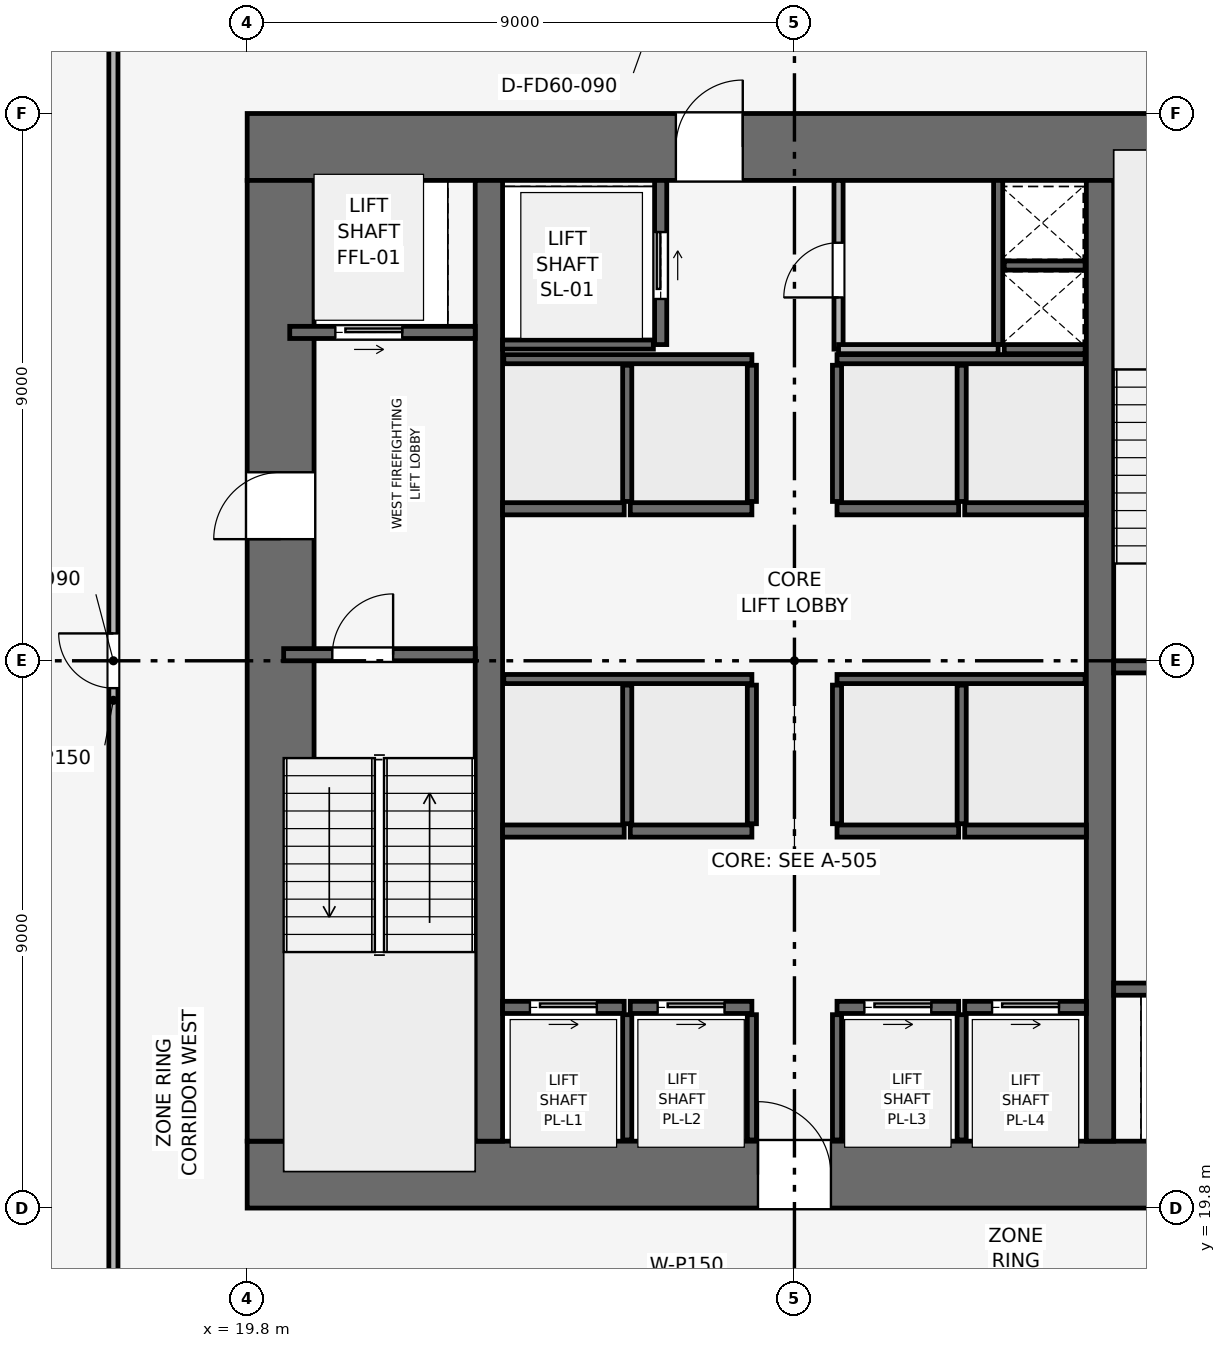
"""IFC4 building model, lengths in metres.
Left out: names, types, materials, properties, quantities, classifications, styles, units other than length and angle.
Written with IfcOpenShell. Run it as: python <this file> out.ifc"""

import sys

from ifc_helpers import new_model, si_unit, direction, frame, frame_2d, origin, place, context, subcontext, project, spatial, rectangle, extrude, element, fill, save


model = new_model("IFC4")
c1 = context("Model", 3, precision=1e-05, world=origin(), true_north=direction((0.0, 1.0)))
c2 = subcontext(c1, "Body", "Model", "MODEL_VIEW")
j1 = project(units=[si_unit("LENGTHUNIT", "METRE"), si_unit("PLANEANGLEUNIT", "RADIAN")], contexts=[c1])
p1 = place(None, origin())
s1 = spatial("IfcSite", under=j1, at=p1, CompositionType="ELEMENT")
p2 = place(p1, origin())
s2 = spatial("IfcBuilding", under=s1, at=p2, CompositionType="ELEMENT")
p3 = place(p2, frame((0.0, 0.0, 96.3)))
s3 = spatial("IfcBuildingStorey", under=s2, at=p3, CompositionType="ELEMENT", Elevation=96.3)
p4 = place(p3, frame((19.8, 20.35, 0.0), z_axis=(0.0, 0.0, 1.0), x_axis=(1.0, 0.0, 0.0)))
e1 = element("IfcWall", 1, at=p4, inside=s3, PredefinedType="SHEAR", context=c2, shape_type="SweptSolid", body=[
    extrude(rectangle(XDim=18.0, YDim=1.1, at=frame_2d((9.0, 0.0))), origin(), (0.0, 0.0, 1.0), 3.9),
])
p5 = place(p4, frame((8.4, 0.0, 0.0)))
e2 = element("IfcOpeningElement", 2, at=p5, cuts=e1, PredefinedType="OPENING", context=c2, shape_type="SweptSolid", body=[
    extrude(rectangle(XDim=1.2, YDim=2.2, at=frame_2d((0.6, 1.1))), frame((0.0, 0.56, 0.0), z_axis=(0.0, -1.0, 0.0), x_axis=(1.0, 0.0, 0.0)), (0.0, 0.0, 1.0), 1.12),
])
p6 = place(p3, frame((19.8, 37.25, 0.0), z_axis=(0.0, 0.0, 1.0), x_axis=(1.0, 0.0, 0.0)))
e3 = element("IfcWall", 3, at=p6, inside=s3, PredefinedType="SHEAR", context=c2, shape_type="SweptSolid", body=[
    extrude(rectangle(XDim=18.0, YDim=1.1, at=frame_2d((9.0, 0.0))), origin(), (0.0, 0.0, 1.0), 3.9),
])
p7 = place(p6, frame((7.05, 0.0, 0.0)))
e4 = element("IfcOpeningElement", 4, at=p7, cuts=e3, PredefinedType="OPENING", context=c2, shape_type="SweptSolid", body=[
    extrude(rectangle(XDim=1.1, YDim=2.15, at=frame_2d((0.55, 1.075))), frame((0.0, 0.56, 0.0), z_axis=(0.0, -1.0, 0.0), x_axis=(1.0, 0.0, 0.0)), (0.0, 0.0, 1.0), 1.12),
])
p8 = place(p3, frame((20.35, 20.9, 0.0), z_axis=(0.0, 0.0, 1.0), x_axis=(0.0, 1.0, 0.0)))
e5 = element("IfcWall", 5, at=p8, inside=s3, PredefinedType="SHEAR", context=c2, shape_type="SweptSolid", body=[
    extrude(rectangle(XDim=15.8, YDim=1.1, at=frame_2d((7.9, 0.0))), origin(), (0.0, 0.0, 1.0), 3.9),
])
p9 = place(p8, frame((9.9, 0.0, 0.0)))
e6 = element("IfcOpeningElement", 6, at=p9, cuts=e5, PredefinedType="OPENING", context=c2, shape_type="SweptSolid", body=[
    extrude(rectangle(XDim=1.1, YDim=2.15, at=frame_2d((0.55, 1.075))), frame((0.0, 0.56, 0.0), z_axis=(0.0, -1.0, 0.0), x_axis=(1.0, 0.0, 0.0)), (0.0, 0.0, 1.0), 1.12),
])
for number, where, z_axis, x_axis in (
    (7, (23.775, 20.9, 0.0), (0.0, 0.0, 1.0), (0.0, 1.0, 0.0)),
    (8, (33.825, 20.9, 0.0), (0.0, 0.0, 1.0), (0.0, 1.0, 0.0)),
):
    element("IfcWall", number, at=place(p3, frame(where, z_axis=z_axis, x_axis=x_axis)), inside=s3, PredefinedType="SHEAR", context=c2, shape_type="SweptSolid", body=[
        extrude(rectangle(XDim=15.8, YDim=0.45, at=frame_2d((7.9, 0.0))), origin(), (0.0, 0.0, 1.0), 3.9),
    ])
p10 = place(p3, frame((20.4, 28.9, 0.0), z_axis=(0.0, 0.0, 1.0), x_axis=(1.0, 0.0, 0.0)))
e9 = element("IfcWall", 9, at=p10, inside=s3, PredefinedType="SHEAR", context=c2, shape_type="SweptSolid", body=[
    extrude(rectangle(XDim=3.15, YDim=0.2, at=frame_2d((1.575, 0.0))), origin(), (0.0, 0.0, 1.0), 3.65),
])
p11 = place(p10, frame((0.8, 0.0, 0.0)))
e10 = element("IfcOpeningElement", 10, at=p11, cuts=e9, PredefinedType="OPENING", context=c2, shape_type="SweptSolid", body=[
    extrude(rectangle(XDim=1.0, YDim=2.1, at=frame_2d((0.5, 1.05))), frame((0.0, 0.11, 0.0), z_axis=(0.0, -1.0, 0.0), x_axis=(1.0, 0.0, 0.0)), (0.0, 0.0, 1.0), 0.22),
])
p12 = place(p3, frame((34.05, 28.7, 0.0), z_axis=(0.0, 0.0, 1.0), x_axis=(1.0, 0.0, 0.0)))
e11 = element("IfcWall", 11, at=p12, inside=s3, PredefinedType="SHEAR", context=c2, shape_type="SweptSolid", body=[
    extrude(rectangle(XDim=3.15, YDim=0.2, at=frame_2d((1.575, 0.0))), origin(), (0.0, 0.0, 1.0), 3.65),
])
p13 = place(p12, frame((0.8, 0.0, 0.0)))
e12 = element("IfcOpeningElement", 12, at=p13, cuts=e11, PredefinedType="OPENING", context=c2, shape_type="SweptSolid", body=[
    extrude(rectangle(XDim=1.0, YDim=2.1, at=frame_2d((0.5, 1.05))), frame((0.0, 0.11, 0.0), z_axis=(0.0, -1.0, 0.0), x_axis=(1.0, 0.0, 0.0)), (0.0, 0.0, 1.0), 0.22),
])
p14 = place(p3, frame((32.15, 34.0, 0.0), z_axis=(0.0, 0.0, 1.0), x_axis=(0.0, 1.0, 0.0)))
e13 = element("IfcWall", 13, at=p14, inside=s3, PredefinedType="SHEAR", context=c2, shape_type="SweptSolid", body=[
    extrude(rectangle(XDim=2.7, YDim=0.15, at=frame_2d((1.35, 0.0))), origin(), (0.0, 0.0, 1.0), 3.65),
])
for number, where, z_axis, x_axis in (
    (14, (32.25, 33.925, 0.0), (0.0, 0.0, 1.0), (1.0, 0.0, 0.0)),
    (15, (32.25, 35.3, 0.0), (0.0, 0.0, 1.0), (1.0, 0.0, 0.0)),
):
    element("IfcWall", number, at=place(p3, frame(where, z_axis=z_axis, x_axis=x_axis)), inside=s3, PredefinedType="SHEAR", context=c2, shape_type="SweptSolid", body=[
        extrude(rectangle(XDim=1.33, YDim=0.15, at=frame_2d((0.665, 0.0))), origin(), (0.0, 0.0, 1.0), 3.65),
    ])
p15 = place(p3, frame((20.5, 34.2, 0.0), z_axis=(0.0, 0.0, 1.0), x_axis=(1.0, 0.0, 0.0)))
e16 = element("IfcWall", 16, at=p15, inside=s3, PredefinedType="SHEAR", context=c2, shape_type="SweptSolid", body=[
    extrude(rectangle(XDim=3.05, YDim=0.2, at=frame_2d((1.525, 0.0))), origin(), (0.0, 0.0, 1.0), 3.65),
])
p16 = place(p15, frame((0.75, 0.0, 0.0)))
e17 = element("IfcOpeningElement", 17, at=p16, cuts=e16, PredefinedType="OPENING", context=c2, shape_type="SweptSolid", body=[
    extrude(rectangle(XDim=1.1, YDim=2.15, at=frame_2d((0.55, 1.075))), frame((0.0, 0.11, 0.0), z_axis=(0.0, -1.0, 0.0), x_axis=(1.0, 0.0, 0.0)), (0.0, 0.0, 1.0), 0.22),
])
p17 = place(p3, frame((34.05, 23.4, 0.0), z_axis=(0.0, 0.0, 1.0), x_axis=(1.0, 0.0, 0.0)))
e18 = element("IfcWall", 18, at=p17, inside=s3, PredefinedType="SHEAR", context=c2, shape_type="SweptSolid", body=[
    extrude(rectangle(XDim=3.05, YDim=0.2, at=frame_2d((1.525, 0.0))), origin(), (0.0, 0.0, 1.0), 3.65),
])
p18 = place(p17, frame((1.2, 0.0, 0.0)))
e19 = element("IfcOpeningElement", 19, at=p18, cuts=e18, PredefinedType="OPENING", context=c2, shape_type="SweptSolid", body=[
    extrude(rectangle(XDim=1.1, YDim=2.15, at=frame_2d((0.55, 1.075))), frame((0.0, 0.11, 0.0), z_axis=(0.0, -1.0, 0.0), x_axis=(1.0, 0.0, 0.0)), (0.0, 0.0, 1.0), 0.22),
])
p19 = place(p3, frame((26.6, 34.0, 0.0), z_axis=(0.0, 0.0, 1.0), x_axis=(0.0, 1.0, 0.0)))
e20 = element("IfcWall", 20, at=p19, inside=s3, PredefinedType="SHEAR", context=c2, shape_type="SweptSolid", body=[
    extrude(rectangle(XDim=2.7, YDim=0.2, at=frame_2d((1.35, 0.0))), origin(), (0.0, 0.0, 1.0), 3.65),
])
p20 = place(p19, frame((0.75, 0.0, 0.0)))
e21 = element("IfcOpeningElement", 21, at=p20, cuts=e20, PredefinedType="OPENING", context=c2, shape_type="SweptSolid", body=[
    extrude(rectangle(XDim=1.1, YDim=2.15, at=frame_2d((0.55, 1.075))), frame((0.0, 0.11, 0.0), z_axis=(0.0, -1.0, 0.0), x_axis=(1.0, 0.0, 0.0)), (0.0, 0.0, 1.0), 0.22),
])
p21 = place(p3, frame((24.0, 34.0, 0.0), z_axis=(0.0, 0.0, 1.0), x_axis=(1.0, 0.0, 0.0)))
e22 = element("IfcWall", 22, at=p21, inside=s3, PredefinedType="SHEAR", context=c2, shape_type="SweptSolid", body=[
    extrude(rectangle(XDim=2.48, YDim=0.15, at=frame_2d((1.24, 0.0))), origin(), (0.0, 0.0, 1.0), 3.65),
])
p22 = place(p3, frame((24.0, 23.1, 0.0), z_axis=(0.0, 0.0, 1.0), x_axis=(1.0, 0.0, 0.0)))
e23 = element("IfcWall", 23, at=p22, inside=s3, PredefinedType="SHEAR", context=c2, shape_type="SweptSolid", body=[
    extrude(rectangle(XDim=2.0, YDim=0.2, at=frame_2d((1.0, 0.0))), origin(), (0.0, 0.0, 1.0), 3.65),
])
p23 = place(p22, frame((0.45, 0.0, 0.0)))
e24 = element("IfcOpeningElement", 24, at=p23, cuts=e23, PredefinedType="OPENING", context=c2, shape_type="SweptSolid", body=[
    extrude(rectangle(XDim=1.1, YDim=2.15, at=frame_2d((0.55, 1.075))), frame((0.0, 0.11, 0.0), z_axis=(0.0, -1.0, 0.0), x_axis=(1.0, 0.0, 0.0)), (0.0, 0.0, 1.0), 0.22),
])
p24 = place(p3, frame((26.1, 23.1, 0.0), z_axis=(0.0, 0.0, 1.0), x_axis=(1.0, 0.0, 0.0)))
e25 = element("IfcWall", 25, at=p24, inside=s3, PredefinedType="SHEAR", context=c2, shape_type="SweptSolid", body=[
    extrude(rectangle(XDim=2.0, YDim=0.2, at=frame_2d((1.0, 0.0))), origin(), (0.0, 0.0, 1.0), 3.65),
])
p25 = place(p24, frame((0.45, 0.0, 0.0)))
e26 = element("IfcOpeningElement", 26, at=p25, cuts=e25, PredefinedType="OPENING", context=c2, shape_type="SweptSolid", body=[
    extrude(rectangle(XDim=1.1, YDim=2.15, at=frame_2d((0.55, 1.075))), frame((0.0, 0.11, 0.0), z_axis=(0.0, -1.0, 0.0), x_axis=(1.0, 0.0, 0.0)), (0.0, 0.0, 1.0), 0.22),
])
p26 = place(p3, frame((29.5, 23.1, 0.0), z_axis=(0.0, 0.0, 1.0), x_axis=(1.0, 0.0, 0.0)))
e27 = element("IfcWall", 27, at=p26, inside=s3, PredefinedType="SHEAR", context=c2, shape_type="SweptSolid", body=[
    extrude(rectangle(XDim=2.0, YDim=0.2, at=frame_2d((1.0, 0.0))), origin(), (0.0, 0.0, 1.0), 3.65),
])
p27 = place(p26, frame((0.45, 0.0, 0.0)))
e28 = element("IfcOpeningElement", 28, at=p27, cuts=e27, PredefinedType="OPENING", context=c2, shape_type="SweptSolid", body=[
    extrude(rectangle(XDim=1.1, YDim=2.15, at=frame_2d((0.55, 1.075))), frame((0.0, 0.11, 0.0), z_axis=(0.0, -1.0, 0.0), x_axis=(1.0, 0.0, 0.0)), (0.0, 0.0, 1.0), 0.22),
])
p28 = place(p3, frame((31.6, 23.1, 0.0), z_axis=(0.0, 0.0, 1.0), x_axis=(1.0, 0.0, 0.0)))
e29 = element("IfcWall", 29, at=p28, inside=s3, PredefinedType="SHEAR", context=c2, shape_type="SweptSolid", body=[
    extrude(rectangle(XDim=2.0, YDim=0.2, at=frame_2d((1.0, 0.0))), origin(), (0.0, 0.0, 1.0), 3.65),
])
p29 = place(p28, frame((0.45, 0.0, 0.0)))
e30 = element("IfcOpeningElement", 30, at=p29, cuts=e29, PredefinedType="OPENING", context=c2, shape_type="SweptSolid", body=[
    extrude(rectangle(XDim=1.1, YDim=2.15, at=frame_2d((0.55, 1.075))), frame((0.0, 0.11, 0.0), z_axis=(0.0, -1.0, 0.0), x_axis=(1.0, 0.0, 0.0)), (0.0, 0.0, 1.0), 0.22),
])
for number, where, z_axis, x_axis in (
    (31, (24.0, 26.0, 0.0), (0.0, 0.0, 1.0), (1.0, 0.0, 0.0)),
    (32, (26.1, 26.0, 0.0), (0.0, 0.0, 1.0), (1.0, 0.0, 0.0)),
    (33, (29.5, 26.0, 0.0), (0.0, 0.0, 1.0), (1.0, 0.0, 0.0)),
    (34, (31.6, 26.0, 0.0), (0.0, 0.0, 1.0), (1.0, 0.0, 0.0)),
    (35, (24.0, 31.3, 0.0), (0.0, 0.0, 1.0), (1.0, 0.0, 0.0)),
    (36, (26.1, 31.3, 0.0), (0.0, 0.0, 1.0), (1.0, 0.0, 0.0)),
    (37, (29.5, 31.3, 0.0), (0.0, 0.0, 1.0), (1.0, 0.0, 0.0)),
    (38, (31.6, 31.3, 0.0), (0.0, 0.0, 1.0), (1.0, 0.0, 0.0)),
):
    element("IfcWall", number, at=place(p3, frame(where, z_axis=z_axis, x_axis=x_axis)), inside=s3, PredefinedType="SHEAR", context=c2, shape_type="SweptSolid", body=[
        extrude(rectangle(XDim=2.0, YDim=0.2, at=frame_2d((1.0, 0.0))), origin(), (0.0, 0.0, 1.0), 3.65),
    ])
for number, where, z_axis, x_axis in (
    (39, (26.05, 20.92, 0.0), (0.0, 0.0, 1.0), (0.0, 1.0, 0.0)),
    (40, (28.1, 20.92, 0.0), (0.0, 0.0, 1.0), (0.0, 1.0, 0.0)),
    (41, (29.5, 20.92, 0.0), (0.0, 0.0, 1.0), (0.0, 1.0, 0.0)),
    (42, (31.55, 20.92, 0.0), (0.0, 0.0, 1.0), (0.0, 1.0, 0.0)),
):
    element("IfcWall", number, at=place(p3, frame(where, z_axis=z_axis, x_axis=x_axis)), inside=s3, PredefinedType="SHEAR", context=c2, shape_type="SweptSolid", body=[
        extrude(rectangle(XDim=2.06, YDim=0.15, at=frame_2d((1.03, 0.0))), origin(), (0.0, 0.0, 1.0), 3.65),
    ])
for number, where, z_axis, x_axis in (
    (43, (24.02, 28.5, 0.0), (0.0, 0.0, 1.0), (1.0, 0.0, 0.0)),
    (44, (29.5, 28.5, 0.0), (0.0, 0.0, 1.0), (1.0, 0.0, 0.0)),
):
    element("IfcWall", number, at=place(p3, frame(where, z_axis=z_axis, x_axis=x_axis)), inside=s3, PredefinedType="SHEAR", context=c2, shape_type="SweptSolid", body=[
        extrude(rectangle(XDim=4.08, YDim=0.15, at=frame_2d((2.04, 0.0))), origin(), (0.0, 0.0, 1.0), 3.65),
    ])
for number, where, z_axis, x_axis in (
    (45, (26.05, 26.12, 0.0), (0.0, 0.0, 1.0), (0.0, 1.0, 0.0)),
    (46, (28.1, 26.12, 0.0), (0.0, 0.0, 1.0), (0.0, 1.0, 0.0)),
    (47, (29.5, 26.12, 0.0), (0.0, 0.0, 1.0), (0.0, 1.0, 0.0)),
    (48, (31.55, 26.12, 0.0), (0.0, 0.0, 1.0), (0.0, 1.0, 0.0)),
):
    element("IfcWall", number, at=place(p3, frame(where, z_axis=z_axis, x_axis=x_axis)), inside=s3, PredefinedType="SHEAR", context=c2, shape_type="SweptSolid", body=[
        extrude(rectangle(XDim=2.28, YDim=0.15, at=frame_2d((1.14, 0.0))), origin(), (0.0, 0.0, 1.0), 3.65),
    ])
for number, where, z_axis, x_axis in (
    (49, (24.02, 33.76, 0.0), (0.0, 0.0, 1.0), (1.0, 0.0, 0.0)),
    (50, (29.5, 33.76, 0.0), (0.0, 0.0, 1.0), (1.0, 0.0, 0.0)),
):
    element("IfcWall", number, at=place(p3, frame(where, z_axis=z_axis, x_axis=x_axis)), inside=s3, PredefinedType="SHEAR", context=c2, shape_type="SweptSolid", body=[
        extrude(rectangle(XDim=4.08, YDim=0.15, at=frame_2d((2.04, 0.0))), origin(), (0.0, 0.0, 1.0), 3.65),
    ])
for number, where, z_axis, x_axis in (
    (51, (26.05, 31.42, 0.0), (0.0, 0.0, 1.0), (0.0, 1.0, 0.0)),
    (52, (28.1, 31.42, 0.0), (0.0, 0.0, 1.0), (0.0, 1.0, 0.0)),
    (53, (29.5, 31.42, 0.0), (0.0, 0.0, 1.0), (0.0, 1.0, 0.0)),
    (54, (31.55, 31.42, 0.0), (0.0, 0.0, 1.0), (0.0, 1.0, 0.0)),
):
    element("IfcWall", number, at=place(p3, frame(where, z_axis=z_axis, x_axis=x_axis)), inside=s3, PredefinedType="SHEAR", context=c2, shape_type="SweptSolid", body=[
        extrude(rectangle(XDim=2.24, YDim=0.15, at=frame_2d((1.12, 0.0))), origin(), (0.0, 0.0, 1.0), 3.65),
    ])
p30 = place(p3, frame((29.525, 33.925, 0.0), z_axis=(0.0, 0.0, 1.0), x_axis=(0.0, 1.0, 0.0)))
e55 = element("IfcWall", 55, at=p30, inside=s3, PredefinedType="PARTITIONING", context=c2, shape_type="SweptSolid", body=[
    extrude(rectangle(XDim=2.775, YDim=0.15, at=frame_2d((1.387, 0.0))), origin(), (0.0, 0.0, 1.0), 3.65),
])
p31 = place(p30, frame((0.85, 0.0, 0.0)))
e56 = element("IfcOpeningElement", 56, at=p31, cuts=e55, PredefinedType="OPENING", context=c2, shape_type="SweptSolid", body=[
    extrude(rectangle(XDim=0.9, YDim=2.1, at=frame_2d((0.45, 1.05))), frame((0.0, 0.085, 0.0), z_axis=(0.0, -1.0, 0.0), x_axis=(1.0, 0.0, 0.0)), (0.0, 0.0, 1.0), 0.17),
])
p32 = place(p3, frame((29.525, 33.925, 0.0), z_axis=(0.0, 0.0, 1.0), x_axis=(1.0, 0.0, 0.0)))
e57 = element("IfcWall", 57, at=p32, inside=s3, PredefinedType="PARTITIONING", context=c2, shape_type="SweptSolid", body=[
    extrude(rectangle(XDim=2.625, YDim=0.15, at=frame_2d((1.312, 0.0))), origin(), (0.0, 0.0, 1.0), 3.65),
])
p33 = place(p3, frame((17.6, 17.6, 0.0), z_axis=(0.0, 0.0, 1.0), x_axis=(0.0, 1.0, 0.0)))
e58 = element("IfcWall", 58, at=p33, inside=s3, PredefinedType="PARTITIONING", context=c2, shape_type="SweptSolid", body=[
    extrude(rectangle(XDim=22.4, YDim=0.15, at=frame_2d((11.2, 0.0))), origin(), (0.0, 0.0, 1.0), 3.085),
])
p34 = place(p33, frame((10.75, 0.0, 0.0)))
e59 = element("IfcOpeningElement", 59, at=p34, cuts=e58, PredefinedType="OPENING", context=c2, shape_type="SweptSolid", body=[
    extrude(rectangle(XDim=0.9, YDim=2.1, at=frame_2d((0.45, 1.05))), frame((0.0, 0.085, 0.0), z_axis=(0.0, -1.0, 0.0), x_axis=(1.0, 0.0, 0.0)), (0.0, 0.0, 1.0), 0.17),
])
p35 = place(p11, origin())
e60 = element("IfcDoor", 60, at=p35, inside=s3, OperationType="SINGLE_SWING_RIGHT", PredefinedType="DOOR", context=c2, shape_type="SweptSolid", body=[
    extrude(rectangle(XDim=1.0, YDim=2.1, at=frame_2d((0.5, 1.05))), frame((0.0, 0.025, 0.0), z_axis=(0.0, -1.0, 0.0), x_axis=(1.0, 0.0, 0.0)), (0.0, 0.0, 1.0), 0.05),
])
fill(e10, e60)
p36 = place(p16, origin())
e61 = element("IfcDoor", 61, at=p36, inside=s3, OperationType="SLIDING_TO_RIGHT", PredefinedType="DOOR", context=c2, shape_type="SweptSolid", body=[
    extrude(rectangle(XDim=1.1, YDim=2.15, at=frame_2d((0.55, 1.075))), frame((0.0, 0.025, 0.0), z_axis=(0.0, -1.0, 0.0), x_axis=(1.0, 0.0, 0.0)), (0.0, 0.0, 1.0), 0.05),
])
fill(e17, e61)
p37 = place(p20, origin())
e62 = element("IfcDoor", 62, at=p37, inside=s3, OperationType="SLIDING_TO_RIGHT", PredefinedType="DOOR", context=c2, shape_type="SweptSolid", body=[
    extrude(rectangle(XDim=1.1, YDim=2.15, at=frame_2d((0.55, 1.075))), frame((0.0, 0.025, 0.0), z_axis=(0.0, -1.0, 0.0), x_axis=(1.0, 0.0, 0.0)), (0.0, 0.0, 1.0), 0.05),
])
fill(e21, e62)
p38 = place(p23, origin())
e63 = element("IfcDoor", 63, at=p38, inside=s3, OperationType="SLIDING_TO_RIGHT", PredefinedType="DOOR", context=c2, shape_type="SweptSolid", body=[
    extrude(rectangle(XDim=1.1, YDim=2.15, at=frame_2d((0.55, 1.075))), frame((0.0, 0.025, 0.0), z_axis=(0.0, -1.0, 0.0), x_axis=(1.0, 0.0, 0.0)), (0.0, 0.0, 1.0), 0.05),
])
fill(e24, e63)
p39 = place(p25, origin())
e64 = element("IfcDoor", 64, at=p39, inside=s3, OperationType="SLIDING_TO_RIGHT", PredefinedType="DOOR", context=c2, shape_type="SweptSolid", body=[
    extrude(rectangle(XDim=1.1, YDim=2.15, at=frame_2d((0.55, 1.075))), frame((0.0, 0.025, 0.0), z_axis=(0.0, -1.0, 0.0), x_axis=(1.0, 0.0, 0.0)), (0.0, 0.0, 1.0), 0.05),
])
fill(e26, e64)
p40 = place(p27, origin())
e65 = element("IfcDoor", 65, at=p40, inside=s3, OperationType="SLIDING_TO_RIGHT", PredefinedType="DOOR", context=c2, shape_type="SweptSolid", body=[
    extrude(rectangle(XDim=1.1, YDim=2.15, at=frame_2d((0.55, 1.075))), frame((0.0, 0.025, 0.0), z_axis=(0.0, -1.0, 0.0), x_axis=(1.0, 0.0, 0.0)), (0.0, 0.0, 1.0), 0.05),
])
fill(e28, e65)
p41 = place(p29, origin())
e66 = element("IfcDoor", 66, at=p41, inside=s3, OperationType="SLIDING_TO_RIGHT", PredefinedType="DOOR", context=c2, shape_type="SweptSolid", body=[
    extrude(rectangle(XDim=1.1, YDim=2.15, at=frame_2d((0.55, 1.075))), frame((0.0, 0.025, 0.0), z_axis=(0.0, -1.0, 0.0), x_axis=(1.0, 0.0, 0.0)), (0.0, 0.0, 1.0), 0.05),
])
fill(e30, e66)
p42 = place(p31, origin())
e67 = element("IfcDoor", 67, at=p42, inside=s3, OperationType="SINGLE_SWING_LEFT", PredefinedType="DOOR", context=c2, shape_type="SweptSolid", body=[
    extrude(rectangle(XDim=0.9, YDim=2.1, at=frame_2d((0.45, 1.05))), frame((0.0, 0.025, 0.0), z_axis=(0.0, -1.0, 0.0), x_axis=(1.0, 0.0, 0.0)), (0.0, 0.0, 1.0), 0.05),
])
fill(e56, e67)
p43 = place(p34, origin())
e68 = element("IfcDoor", 68, at=p43, inside=s3, OperationType="SINGLE_SWING_RIGHT", PredefinedType="DOOR", context=c2, shape_type="SweptSolid", body=[
    extrude(rectangle(XDim=0.9, YDim=2.1, at=frame_2d((0.45, 1.05))), frame((0.0, 0.025, 0.0), z_axis=(0.0, -1.0, 0.0), x_axis=(1.0, 0.0, 0.0)), (0.0, 0.0, 1.0), 0.05),
])
fill(e59, e68)
p44 = place(p9, origin())
e69 = element("IfcDoor", 69, at=p44, inside=s3, OperationType="SINGLE_SWING_LEFT", PredefinedType="DOOR", context=c2, shape_type="SweptSolid", body=[
    extrude(rectangle(XDim=1.1, YDim=2.15, at=frame_2d((0.55, 1.075))), frame((0.0, 0.025, 0.0), z_axis=(0.0, -1.0, 0.0), x_axis=(1.0, 0.0, 0.0)), (0.0, 0.0, 1.0), 0.05),
])
fill(e6, e69)
p45 = place(p5, origin())
e70 = element("IfcDoor", 70, at=p45, inside=s3, OperationType="SINGLE_SWING_LEFT", PredefinedType="DOOR", context=c2, shape_type="SweptSolid", body=[
    extrude(rectangle(XDim=1.2, YDim=2.2, at=frame_2d((0.6, 1.1))), frame((0.0, 0.025, 0.0), z_axis=(0.0, -1.0, 0.0), x_axis=(1.0, 0.0, 0.0)), (0.0, 0.0, 1.0), 0.05),
])
fill(e2, e70)
p46 = place(p7, origin())
e71 = element("IfcDoor", 71, at=p46, inside=s3, OperationType="SINGLE_SWING_RIGHT", PredefinedType="DOOR", context=c2, shape_type="SweptSolid", body=[
    extrude(rectangle(XDim=1.1, YDim=2.15, at=frame_2d((0.55, 1.075))), frame((0.0, 0.025, 0.0), z_axis=(0.0, -1.0, 0.0), x_axis=(1.0, 0.0, 0.0)), (0.0, 0.0, 1.0), 0.05),
])
fill(e4, e71)
save(model, sys.argv[1])
